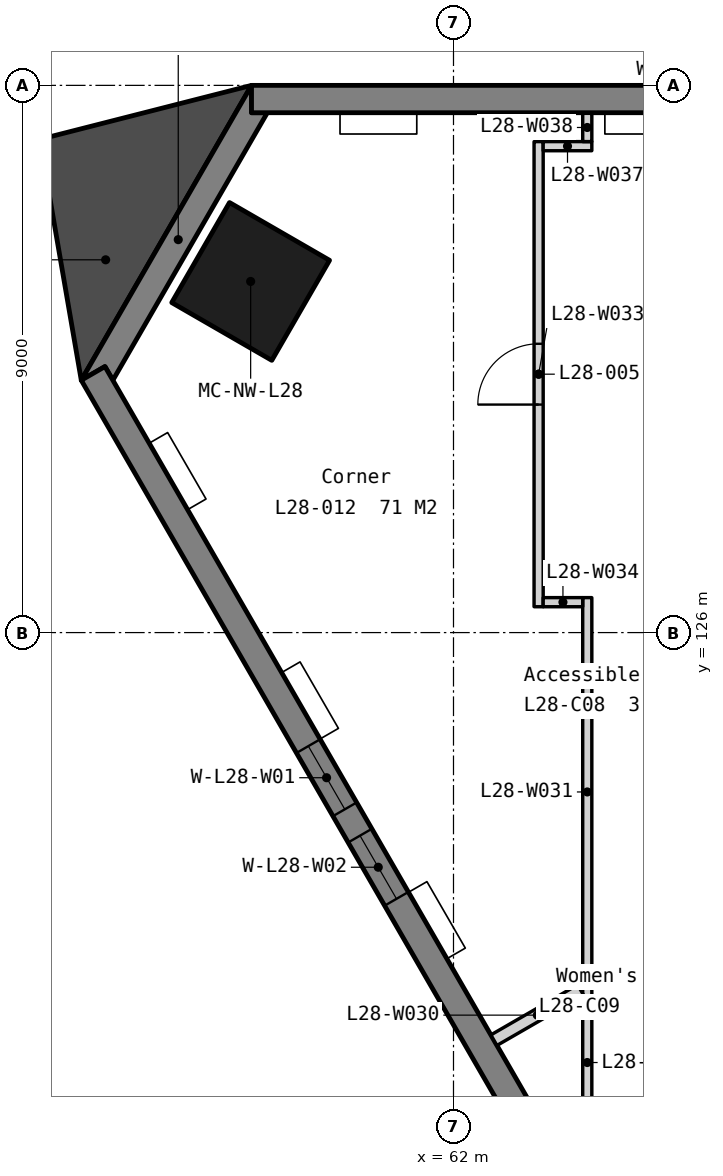
"""IFC4 building model, lengths in metres.
Left out: names, types, materials, properties, quantities, classifications, styles, units other than length and angle.
Written with IfcOpenShell. Run it as: python <this file> out.ifc"""

import sys

from ifc_helpers import new_model, si_unit, direction, frame, frame_2d, origin, origin_2d, place, context, subcontext, project, spatial, polyline, rectangle, outline, extrude, element, fill, save


model = new_model("IFC4")
c1 = context("Model", 3, precision=1e-05, world=origin(), true_north=direction((0.0, 1.0)))
c2 = subcontext(c1, "Body", "Model", "MODEL_VIEW")
j1 = project(units=[si_unit("LENGTHUNIT", "METRE"), si_unit("PLANEANGLEUNIT", "RADIAN")], contexts=[c1])
p1 = place(None, origin())
s1 = spatial("IfcSite", under=j1, at=p1, CompositionType="ELEMENT")
p2 = place(p1, origin())
s2 = spatial("IfcBuilding", under=s1, at=p2, CompositionType="ELEMENT")
p3 = place(p2, frame((0.0, 0.0, 113.3)))
s3 = spatial("IfcBuildingStorey", under=s2, at=p3, CompositionType="ELEMENT", Elevation=113.3)
p4 = place(p3, frame((58.664, 131.775, 0.0), z_axis=(0.0, 0.0, 1.0), x_axis=(-0.5, -0.866025403784, 0.0)))
e1 = element("IfcColumn", 1, at=p4, inside=s3, PredefinedType="COLUMN", context=c2, shape_type="SweptSolid", body=[
    extrude(rectangle(XDim=1.9, YDim=1.9, at=origin_2d()), origin(), (0.0, 0.0, 1.0), 3.5),
])
p5 = place(p3, frame((0.0, 0.0, -0.15)))
e2 = element("IfcWall", 2, at=p5, inside=s3, PredefinedType="SOLIDWALL", context=c2, shape_type="SweptSolid", body=[
    extrude(outline(polyline([(58.678, 135.0), (58.678, 134.55), (58.938, 134.55), (56.398, 130.15), (56.268, 130.375), (55.878, 130.15), (58.678, 135.0)])), origin(), (0.0, 0.0, 1.0), 3.5),
])
p6 = place(p3, frame((101.322, 134.775, -0.15), z_axis=(0.0, 0.0, 1.0), x_axis=(-1.0, 0.0, 0.0)))
e3 = element("IfcWall", 3, at=p6, inside=s3, PredefinedType="SOLIDWALL", context=c2, shape_type="SweptSolid", body=[
    extrude(outline(polyline([(42.643, 0.0), (42.643, 3.5), (0.0, 3.5), (0.0, 0.0), (42.643, 0.0)])), frame((0.0, 0.225, 0.0), z_axis=(0.0, -1.0, 0.0), x_axis=(1.0, 0.0, 0.0)), (0.0, 0.0, 1.0), 0.45),
])
p7 = place(p6, frame((7.079, 0.0, 1.05)))
e4 = element("IfcOpeningElement", 4, at=p7, cuts=e3, PredefinedType="OPENING", context=c2, shape_type="SweptSolid", body=[
    extrude(rectangle(XDim=1.2, YDim=1.5, at=frame_2d((0.6, 0.75))), frame((0.0, 0.235, 0.0), z_axis=(0.0, -1.0, 0.0), x_axis=(1.0, 0.0, 0.0)), (0.0, 0.0, 1.0), 0.47),
])
p8 = place(p6, frame((8.779, 0.0, 1.05)))
e5 = element("IfcOpeningElement", 5, at=p8, cuts=e3, PredefinedType="OPENING", context=c2, shape_type="SweptSolid", body=[
    extrude(rectangle(XDim=1.2, YDim=1.5, at=frame_2d((0.6, 0.75))), frame((0.0, 0.235, 0.0), z_axis=(0.0, -1.0, 0.0), x_axis=(1.0, 0.0, 0.0)), (0.0, 0.0, 1.0), 0.47),
])
p9 = place(p6, frame((15.607, 0.0, 1.05)))
e6 = element("IfcOpeningElement", 6, at=p9, cuts=e3, PredefinedType="OPENING", context=c2, shape_type="SweptSolid", body=[
    extrude(rectangle(XDim=1.2, YDim=1.5, at=frame_2d((0.6, 0.75))), frame((0.0, 0.235, 0.0), z_axis=(0.0, -1.0, 0.0), x_axis=(1.0, 0.0, 0.0)), (0.0, 0.0, 1.0), 0.47),
])
p10 = place(p6, frame((17.307, 0.0, 1.05)))
e7 = element("IfcOpeningElement", 7, at=p10, cuts=e3, PredefinedType="OPENING", context=c2, shape_type="SweptSolid", body=[
    extrude(rectangle(XDim=1.2, YDim=1.5, at=frame_2d((0.6, 0.75))), frame((0.0, 0.235, 0.0), z_axis=(0.0, -1.0, 0.0), x_axis=(1.0, 0.0, 0.0)), (0.0, 0.0, 1.0), 0.47),
])
p11 = place(p6, frame((24.136, 0.0, 1.05)))
e8 = element("IfcOpeningElement", 8, at=p11, cuts=e3, PredefinedType="OPENING", context=c2, shape_type="SweptSolid", body=[
    extrude(rectangle(XDim=1.2, YDim=1.5, at=frame_2d((0.6, 0.75))), frame((0.0, 0.235, 0.0), z_axis=(0.0, -1.0, 0.0), x_axis=(1.0, 0.0, 0.0)), (0.0, 0.0, 1.0), 0.47),
])
p12 = place(p6, frame((25.836, 0.0, 1.05)))
e9 = element("IfcOpeningElement", 9, at=p12, cuts=e3, PredefinedType="OPENING", context=c2, shape_type="SweptSolid", body=[
    extrude(rectangle(XDim=1.2, YDim=1.5, at=frame_2d((0.6, 0.75))), frame((0.0, 0.235, 0.0), z_axis=(0.0, -1.0, 0.0), x_axis=(1.0, 0.0, 0.0)), (0.0, 0.0, 1.0), 0.47),
])
p13 = place(p6, frame((32.665, 0.0, 1.05)))
e10 = element("IfcOpeningElement", 10, at=p13, cuts=e3, PredefinedType="OPENING", context=c2, shape_type="SweptSolid", body=[
    extrude(rectangle(XDim=1.2, YDim=1.5, at=frame_2d((0.6, 0.75))), frame((0.0, 0.235, 0.0), z_axis=(0.0, -1.0, 0.0), x_axis=(1.0, 0.0, 0.0)), (0.0, 0.0, 1.0), 0.47),
])
p14 = place(p6, frame((34.365, 0.0, 1.05)))
e11 = element("IfcOpeningElement", 11, at=p14, cuts=e3, PredefinedType="OPENING", context=c2, shape_type="SweptSolid", body=[
    extrude(rectangle(XDim=1.2, YDim=1.5, at=frame_2d((0.6, 0.75))), frame((0.0, 0.235, 0.0), z_axis=(0.0, -1.0, 0.0), x_axis=(1.0, 0.0, 0.0)), (0.0, 0.0, 1.0), 0.47),
])
p15 = place(p3, frame((56.073, 130.263, -0.15), z_axis=(0.0, 0.0, 1.0), x_axis=(0.500000478905, -0.866025127289, 0.0)))
e12 = element("IfcWall", 12, at=p15, inside=s3, PredefinedType="SOLIDWALL", context=c2, shape_type="SweptSolid", body=[
    extrude(outline(polyline([(42.643, 0.0), (42.643, 3.5), (0.0, 3.5), (0.0, 0.0), (42.643, 0.0)])), frame((0.0, 0.225, 0.0), z_axis=(0.0, -1.0, 0.0), x_axis=(1.0, 0.0, 0.0)), (0.0, 0.0, 1.0), 0.45),
])
p16 = place(p15, frame((7.079, 0.0, 1.05)))
e13 = element("IfcOpeningElement", 13, at=p16, cuts=e12, PredefinedType="OPENING", context=c2, shape_type="SweptSolid", body=[
    extrude(rectangle(XDim=1.2, YDim=1.5, at=frame_2d((0.6, 0.75))), frame((0.0, 0.235, 0.0), z_axis=(0.0, -1.0, 0.0), x_axis=(1.0, 0.0, 0.0)), (0.0, 0.0, 1.0), 0.47),
])
p17 = place(p15, frame((8.779, 0.0, 1.05)))
e14 = element("IfcOpeningElement", 14, at=p17, cuts=e12, PredefinedType="OPENING", context=c2, shape_type="SweptSolid", body=[
    extrude(rectangle(XDim=1.2, YDim=1.5, at=frame_2d((0.6, 0.75))), frame((0.0, 0.235, 0.0), z_axis=(0.0, -1.0, 0.0), x_axis=(1.0, 0.0, 0.0)), (0.0, 0.0, 1.0), 0.47),
])
p18 = place(p15, frame((15.607, 0.0, 1.05)))
e15 = element("IfcOpeningElement", 15, at=p18, cuts=e12, PredefinedType="OPENING", context=c2, shape_type="SweptSolid", body=[
    extrude(rectangle(XDim=1.2, YDim=1.5, at=frame_2d((0.6, 0.75))), frame((0.0, 0.235, 0.0), z_axis=(0.0, -1.0, 0.0), x_axis=(1.0, 0.0, 0.0)), (0.0, 0.0, 1.0), 0.47),
])
p19 = place(p15, frame((17.307, 0.0, 1.05)))
e16 = element("IfcOpeningElement", 16, at=p19, cuts=e12, PredefinedType="OPENING", context=c2, shape_type="SweptSolid", body=[
    extrude(rectangle(XDim=1.2, YDim=1.5, at=frame_2d((0.6, 0.75))), frame((0.0, 0.235, 0.0), z_axis=(0.0, -1.0, 0.0), x_axis=(1.0, 0.0, 0.0)), (0.0, 0.0, 1.0), 0.47),
])
p20 = place(p15, frame((24.136, 0.0, 1.05)))
e17 = element("IfcOpeningElement", 17, at=p20, cuts=e12, PredefinedType="OPENING", context=c2, shape_type="SweptSolid", body=[
    extrude(rectangle(XDim=1.2, YDim=1.5, at=frame_2d((0.6, 0.75))), frame((0.0, 0.235, 0.0), z_axis=(0.0, -1.0, 0.0), x_axis=(1.0, 0.0, 0.0)), (0.0, 0.0, 1.0), 0.47),
])
p21 = place(p15, frame((25.836, 0.0, 1.05)))
e18 = element("IfcOpeningElement", 18, at=p21, cuts=e12, PredefinedType="OPENING", context=c2, shape_type="SweptSolid", body=[
    extrude(rectangle(XDim=1.2, YDim=1.5, at=frame_2d((0.6, 0.75))), frame((0.0, 0.235, 0.0), z_axis=(0.0, -1.0, 0.0), x_axis=(1.0, 0.0, 0.0)), (0.0, 0.0, 1.0), 0.47),
])
p22 = place(p15, frame((32.665, 0.0, 1.05)))
e19 = element("IfcOpeningElement", 19, at=p22, cuts=e12, PredefinedType="OPENING", context=c2, shape_type="SweptSolid", body=[
    extrude(rectangle(XDim=1.2, YDim=1.5, at=frame_2d((0.6, 0.75))), frame((0.0, 0.235, 0.0), z_axis=(0.0, -1.0, 0.0), x_axis=(1.0, 0.0, 0.0)), (0.0, 0.0, 1.0), 0.47),
])
p23 = place(p15, frame((34.365, 0.0, 1.05)))
e20 = element("IfcOpeningElement", 20, at=p23, cuts=e12, PredefinedType="OPENING", context=c2, shape_type="SweptSolid", body=[
    extrude(rectangle(XDim=1.2, YDim=1.5, at=frame_2d((0.6, 0.75))), frame((0.0, 0.235, 0.0), z_axis=(0.0, -1.0, 0.0), x_axis=(1.0, 0.0, 0.0)), (0.0, 0.0, 1.0), 0.47),
])
p24 = place(p3, frame((0.0, 0.0, -0.15)))
e21 = element("IfcWall", 21, at=p24, inside=s3, PredefinedType="SOLIDWALL", context=c2, shape_type="SweptSolid", body=[
    extrude(outline(polyline([(58.678, 135.0), (55.195, 134.112), (55.878, 130.15), (58.678, 135.0)])), origin(), (0.0, 0.0, 1.0), 3.5),
])
p25 = place(p3, frame((64.2, 117.675, 0.0), z_axis=(0.0, 0.0, 1.0), x_axis=(0.0, 1.0, 0.0)))
e22 = element("IfcWall", 22, at=p25, inside=s3, PredefinedType="PARTITIONING", context=c2, shape_type="SweptSolid", body=[
    extrude(rectangle(XDim=2.508, YDim=0.15, at=frame_2d((1.254, 0.0))), origin(), (0.0, 0.0, 1.0), 3.35),
])
p26 = place(p3, frame((62.665, 119.296, 0.0), z_axis=(0.0, 0.0, 1.0), x_axis=(0.866101713734, 0.499867803992, 0.0)))
e23 = element("IfcWall", 23, at=p26, inside=s3, PredefinedType="PARTITIONING", context=c2, shape_type="SweptSolid", body=[
    extrude(rectangle(XDim=1.648, YDim=0.2, at=frame_2d((0.824, 0.0))), origin(), (0.0, 0.0, 1.0), 3.35),
])
p27 = place(p3, frame((64.2, 120.183, 0.0), z_axis=(0.0, 0.0, 1.0), x_axis=(0.0, 1.0, 0.0)))
e24 = element("IfcWall", 24, at=p27, inside=s3, PredefinedType="PARTITIONING", context=c2, shape_type="SweptSolid", body=[
    extrude(rectangle(XDim=6.392, YDim=0.15, at=frame_2d((3.196, 0.0))), origin(), (0.0, 0.0, 1.0), 3.35),
])
p28 = place(p3, frame((63.4, 126.425, 0.0), z_axis=(0.0, 0.0, 1.0), x_axis=(0.0, 1.0, 0.0)))
e25 = element("IfcWall", 25, at=p28, inside=s3, PredefinedType="PARTITIONING", context=c2, shape_type="SweptSolid", body=[
    extrude(rectangle(XDim=7.65, YDim=0.15, at=frame_2d((3.825, 0.0))), origin(), (0.0, 0.0, 1.0), 3.35),
])
p29 = place(p28, frame((3.325, 0.0, 0.0)))
e26 = element("IfcOpeningElement", 26, at=p29, cuts=e25, PredefinedType="OPENING", context=c2, shape_type="SweptSolid", body=[
    extrude(rectangle(XDim=1.0, YDim=2.1, at=frame_2d((0.5, 1.05))), frame((0.0, 0.085, 0.0), z_axis=(0.0, -1.0, 0.0), x_axis=(1.0, 0.0, 0.0)), (0.0, 0.0, 1.0), 0.17),
])
p30 = place(p3, frame((63.475, 126.5, 0.0), z_axis=(0.0, 0.0, 1.0), x_axis=(1.0, 0.0, 0.0)))
e27 = element("IfcWall", 27, at=p30, inside=s3, PredefinedType="PARTITIONING", context=c2, shape_type="SweptSolid", body=[
    extrude(rectangle(XDim=0.65, YDim=0.15, at=frame_2d((0.325, 0.0))), origin(), (0.0, 0.0, 1.0), 3.35),
])
p31 = place(p3, frame((63.475, 134.0, 0.0), z_axis=(0.0, 0.0, 1.0), x_axis=(1.0, 0.0, 0.0)))
e28 = element("IfcWall", 28, at=p31, inside=s3, PredefinedType="PARTITIONING", context=c2, shape_type="SweptSolid", body=[
    extrude(rectangle(XDim=0.8, YDim=0.15, at=frame_2d((0.4, 0.0))), origin(), (0.0, 0.0, 1.0), 2.886),
])
p32 = place(p3, frame((64.2, 134.075, 0.0), z_axis=(0.0, 0.0, 1.0), x_axis=(0.0, 1.0, 0.0)))
e29 = element("IfcWall", 29, at=p32, inside=s3, PredefinedType="PARTITIONING", context=c2, shape_type="SweptSolid", body=[
    extrude(rectangle(XDim=0.465, YDim=0.15, at=frame_2d((0.232, 0.0))), origin(), (0.0, 0.0, 1.0), 3.35),
])
p33 = place(p16, origin())
e30 = element("IfcWindow", 30, at=p33, inside=s3, PartitioningType="SINGLE_PANEL", PredefinedType="WINDOW", context=c2, shape_type="SweptSolid", body=[
    extrude(rectangle(XDim=1.2, YDim=1.5, at=frame_2d((0.6, 0.75))), frame((0.0, 0.03, 0.0), z_axis=(0.0, -1.0, 0.0), x_axis=(1.0, 0.0, 0.0)), (0.0, 0.0, 1.0), 0.06),
])
fill(e13, e30)
p34 = place(p17, origin())
e31 = element("IfcWindow", 31, at=p34, inside=s3, PartitioningType="SINGLE_PANEL", PredefinedType="WINDOW", context=c2, shape_type="SweptSolid", body=[
    extrude(rectangle(XDim=1.2, YDim=1.5, at=frame_2d((0.6, 0.75))), frame((0.0, 0.03, 0.0), z_axis=(0.0, -1.0, 0.0), x_axis=(1.0, 0.0, 0.0)), (0.0, 0.0, 1.0), 0.06),
])
fill(e14, e31)
p35 = place(p29, origin())
e32 = element("IfcDoor", 32, at=p35, inside=s3, OperationType="SINGLE_SWING_LEFT", PredefinedType="DOOR", context=c2, shape_type="SweptSolid", body=[
    extrude(rectangle(XDim=1.0, YDim=2.1, at=frame_2d((0.5, 1.05))), frame((0.0, 0.025, 0.0), z_axis=(0.0, -1.0, 0.0), x_axis=(1.0, 0.0, 0.0)), (0.0, 0.0, 1.0), 0.05),
])
fill(e26, e32)
save(model, sys.argv[1])
